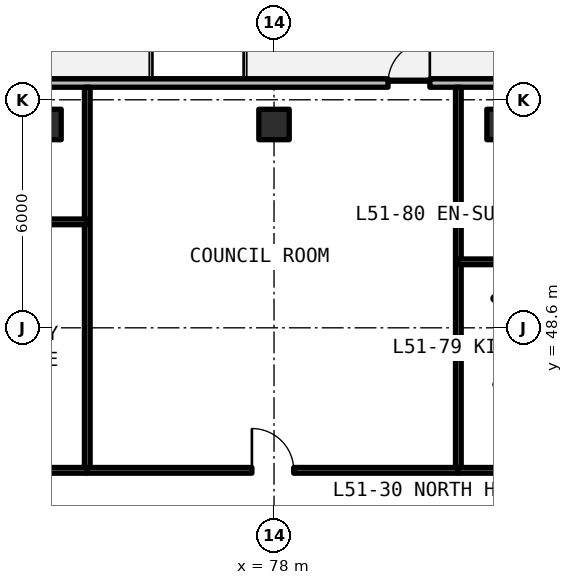
"""IFC4 building model, lengths in metres.
Left out: names, types, materials, properties, quantities, classifications, styles, units other than length and angle.
Written with IfcOpenShell. Run it as: python <this file> out.ifc"""

import sys

from ifc_helpers import new_model, si_unit, direction, frame, frame_2d, origin, origin_2d, place, context, subcontext, project, spatial, rectangle, extrude, element, fill, save


model = new_model("IFC4")
c1 = context("Model", 3, precision=1e-05, world=origin(), true_north=direction((0.0, 1.0)))
c2 = subcontext(c1, "Body", "Model", "MODEL_VIEW")
j1 = project(units=[si_unit("LENGTHUNIT", "METRE"), si_unit("PLANEANGLEUNIT", "RADIAN")], contexts=[c1])
p1 = place(None, origin())
s1 = spatial("IfcSite", under=j1, at=p1, CompositionType="ELEMENT")
p2 = place(p1, origin())
s2 = spatial("IfcBuilding", under=s1, at=p2, CompositionType="ELEMENT")
p3 = place(p2, frame((0.0, 0.0, 185.13)))
s3 = spatial("IfcBuildingStorey", under=s2, at=p3, CompositionType="ELEMENT", Elevation=185.13)
for number, where, z_axis, x_axis in (
    (1, (72.0, 53.95, 0.0), (0.0, 0.0, 1.0), (1.0, 0.0, 0.0)),
    (2, (78.0, 53.95, 0.0), (0.0, 0.0, 1.0), (1.0, 0.0, 0.0)),
    (3, (84.0, 53.95, 0.0), (0.0, 0.0, 1.0), (1.0, 0.0, 0.0)),
):
    element("IfcColumn", number, at=place(p3, frame(where, z_axis=z_axis, x_axis=x_axis)), inside=s3, PredefinedType="COLUMN", context=c2, shape_type="SweptSolid", body=[
        extrude(rectangle(XDim=0.8, YDim=0.8, at=origin_2d()), origin(), (0.0, 0.0, 1.0), 3.3),
    ])
p4 = place(p3, frame((95.354, 55.04, 0.0), z_axis=(0.0, 0.0, 1.0), x_axis=(-1.0, 0.0, 0.0)))
e4 = element("IfcWall", 4, at=p4, inside=s3, PredefinedType="SOLIDWALL", context=c2, shape_type="SweptSolid", body=[
    extrude(rectangle(XDim=43.244, YDim=0.22, at=frame_2d((21.622, 0.0))), origin(), (0.0, 0.0, 1.0), 3.08),
])
p5 = place(p4, frame((37.204, 0.0, 0.0)))
e5 = element("IfcOpeningElement", 5, at=p5, cuts=e4, PredefinedType="OPENING", context=c2, shape_type="SweptSolid", body=[
    extrude(rectangle(XDim=1.1, YDim=2.15, at=frame_2d((0.55, 1.075))), frame((0.0, 0.12, 0.0), z_axis=(0.0, -1.0, 0.0), x_axis=(1.0, 0.0, 0.0)), (0.0, 0.0, 1.0), 0.24),
])
p6 = place(p4, frame((25.104, 0.0, 0.0)))
e6 = element("IfcOpeningElement", 6, at=p6, cuts=e4, PredefinedType="OPENING", context=c2, shape_type="SweptSolid", body=[
    extrude(rectangle(XDim=1.1, YDim=2.15, at=frame_2d((0.55, 1.075))), frame((0.0, 0.12, 0.0), z_axis=(0.0, -1.0, 0.0), x_axis=(1.0, 0.0, 0.0)), (0.0, 0.0, 1.0), 0.24),
])
p7 = place(p4, frame((13.254, 0.0, 0.0)))
e7 = element("IfcOpeningElement", 7, at=p7, cuts=e4, PredefinedType="OPENING", context=c2, shape_type="SweptSolid", body=[
    extrude(rectangle(XDim=1.1, YDim=2.15, at=frame_2d((0.55, 1.075))), frame((0.0, 0.12, 0.0), z_axis=(0.0, -1.0, 0.0), x_axis=(1.0, 0.0, 0.0)), (0.0, 0.0, 1.0), 0.24),
])
p8 = place(p4, frame((32.815, 0.0, 0.78)))
e8 = element("IfcOpeningElement", 8, at=p8, cuts=e4, PredefinedType="OPENING", context=c2, shape_type="SweptSolid", body=[
    extrude(rectangle(XDim=1.65, YDim=1.66, at=frame_2d((0.825, 0.83))), frame((0.0, 0.12, 0.0), z_axis=(0.0, -1.0, 0.0), x_axis=(1.0, 0.0, 0.0)), (0.0, 0.0, 1.0), 0.24),
])
p9 = place(p4, frame((8.458, 0.0, 0.78)))
e9 = element("IfcOpeningElement", 9, at=p9, cuts=e4, PredefinedType="OPENING", context=c2, shape_type="SweptSolid", body=[
    extrude(rectangle(XDim=1.65, YDim=1.66, at=frame_2d((0.825, 0.83))), frame((0.0, 0.12, 0.0), z_axis=(0.0, -1.0, 0.0), x_axis=(1.0, 0.0, 0.0)), (0.0, 0.0, 1.0), 0.24),
])
p10 = place(p4, frame((2.303, 0.0, 0.78)))
e10 = element("IfcOpeningElement", 10, at=p10, cuts=e4, PredefinedType="OPENING", context=c2, shape_type="SweptSolid", body=[
    extrude(rectangle(XDim=1.65, YDim=1.66, at=frame_2d((0.825, 0.83))), frame((0.0, 0.12, 0.0), z_axis=(0.0, -1.0, 0.0), x_axis=(1.0, 0.0, 0.0)), (0.0, 0.0, 1.0), 0.24),
])
p11 = place(p3, frame((73.086, 44.85, 0.0), z_axis=(0.0, 0.0, 1.0), x_axis=(0.0, 1.0, 0.0)))
e11 = element("IfcWall", 11, at=p11, inside=s3, PredefinedType="SOLIDWALL", context=c2, shape_type="SweptSolid", body=[
    extrude(rectangle(XDim=10.08, YDim=0.15, at=frame_2d((5.04, 0.0))), origin(), (0.0, 0.0, 1.0), 2.35),
])
p12 = place(p3, frame((64.757, 51.388, 0.0), z_axis=(0.0, 0.0, 1.0), x_axis=(1.0, 0.0, 0.0)))
e12 = element("IfcWall", 12, at=p12, inside=s3, PredefinedType="PARTITIONING", context=c2, shape_type="SweptSolid", body=[
    extrude(rectangle(XDim=8.329, YDim=0.15, at=frame_2d((4.165, 0.0))), origin(), (0.0, 0.0, 1.0), 2.35),
])
p13 = place(p12, frame((5.361, 0.0, 0.0)))
e13 = element("IfcOpeningElement", 13, at=p13, cuts=e12, PredefinedType="OPENING", context=c2, shape_type="SweptSolid", body=[
    extrude(rectangle(XDim=0.85, YDim=2.1, at=frame_2d((0.425, 1.05))), frame((0.0, 0.085, 0.0), z_axis=(0.0, -1.0, 0.0), x_axis=(1.0, 0.0, 0.0)), (0.0, 0.0, 1.0), 0.17),
])
p14 = place(p3, frame((64.757, 44.85, 0.0), z_axis=(0.0, 0.0, 1.0), x_axis=(1.0, 0.0, 0.0)))
e14 = element("IfcWall", 14, at=p14, inside=s3, PredefinedType="SOLIDWALL", context=c2, shape_type="SweptSolid", body=[
    extrude(rectangle(XDim=8.329, YDim=0.15, at=frame_2d((4.165, 0.0))), origin(), (0.0, 0.0, 1.0), 2.35),
])
p15 = place(p14, frame((5.311, 0.0, 0.0)))
e15 = element("IfcOpeningElement", 15, at=p15, cuts=e14, PredefinedType="OPENING", context=c2, shape_type="SweptSolid", body=[
    extrude(rectangle(XDim=0.95, YDim=2.15, at=frame_2d((0.475, 1.075))), frame((0.0, 0.085, 0.0), z_axis=(0.0, -1.0, 0.0), x_axis=(1.0, 0.0, 0.0)), (0.0, 0.0, 1.0), 0.17),
])
p16 = place(p3, frame((82.85, 44.85, 0.0), z_axis=(0.0, 0.0, 1.0), x_axis=(0.0, 1.0, 0.0)))
e16 = element("IfcWall", 16, at=p16, inside=s3, PredefinedType="SOLIDWALL", context=c2, shape_type="SweptSolid", body=[
    extrude(rectangle(XDim=10.08, YDim=0.15, at=frame_2d((5.04, 0.0))), origin(), (0.0, 0.0, 1.0), 2.35),
])
p17 = place(p3, frame((73.086, 44.85, 0.0), z_axis=(0.0, 0.0, 1.0), x_axis=(1.0, 0.0, 0.0)))
e17 = element("IfcWall", 17, at=p17, inside=s3, PredefinedType="SOLIDWALL", context=c2, shape_type="SweptSolid", body=[
    extrude(rectangle(XDim=9.765, YDim=0.15, at=frame_2d((4.882, 0.0))), origin(), (0.0, 0.0, 1.0), 2.35),
])
p18 = place(p17, frame((4.333, 0.0, 0.0)))
e18 = element("IfcOpeningElement", 18, at=p18, cuts=e17, PredefinedType="OPENING", context=c2, shape_type="SweptSolid", body=[
    extrude(rectangle(XDim=1.1, YDim=2.15, at=frame_2d((0.55, 1.075))), frame((0.0, 0.085, 0.0), z_axis=(0.0, -1.0, 0.0), x_axis=(1.0, 0.0, 0.0)), (0.0, 0.0, 1.0), 0.17),
])
p19 = place(p3, frame((82.85, 48.087, 0.0), z_axis=(0.0, 0.0, 1.0), x_axis=(1.0, 0.0, 0.0)))
e19 = element("IfcWall", 19, at=p19, inside=s3, PredefinedType="PARTITIONING", context=c2, shape_type="SweptSolid", body=[
    extrude(rectangle(XDim=3.07, YDim=0.15, at=frame_2d((1.535, 0.0))), origin(), (0.0, 0.0, 1.0), 2.35),
])
p20 = place(p3, frame((82.85, 50.336, 0.0), z_axis=(0.0, 0.0, 1.0), x_axis=(1.0, 0.0, 0.0)))
e20 = element("IfcWall", 20, at=p20, inside=s3, PredefinedType="PARTITIONING", context=c2, shape_type="SweptSolid", body=[
    extrude(rectangle(XDim=12.35, YDim=0.15, at=frame_2d((6.175, 0.0))), origin(), (0.0, 0.0, 1.0), 2.35),
])
p21 = place(p20, frame((4.321, 0.0, 0.0)))
e21 = element("IfcOpeningElement", 21, at=p21, cuts=e20, PredefinedType="OPENING", context=c2, shape_type="SweptSolid", body=[
    extrude(rectangle(XDim=0.85, YDim=2.1, at=frame_2d((0.425, 1.05))), frame((0.0, 0.085, 0.0), z_axis=(0.0, -1.0, 0.0), x_axis=(1.0, 0.0, 0.0)), (0.0, 0.0, 1.0), 0.17),
])
p22 = place(p20, frame((8.961, 0.0, 0.0)))
e22 = element("IfcOpeningElement", 22, at=p22, cuts=e20, PredefinedType="OPENING", context=c2, shape_type="SweptSolid", body=[
    extrude(rectangle(XDim=0.85, YDim=2.1, at=frame_2d((0.425, 1.05))), frame((0.0, 0.085, 0.0), z_axis=(0.0, -1.0, 0.0), x_axis=(1.0, 0.0, 0.0)), (0.0, 0.0, 1.0), 0.17),
])
p23 = place(p3, frame((82.85, 44.85, 0.0), z_axis=(0.0, 0.0, 1.0), x_axis=(1.0, 0.0, 0.0)))
e23 = element("IfcWall", 23, at=p23, inside=s3, PredefinedType="SOLIDWALL", context=c2, shape_type="SweptSolid", body=[
    extrude(rectangle(XDim=12.35, YDim=0.15, at=frame_2d((6.175, 0.0))), origin(), (0.0, 0.0, 1.0), 2.35),
])
p24 = place(p23, frame((7.275, 0.0, 0.0)))
e24 = element("IfcOpeningElement", 24, at=p24, cuts=e23, PredefinedType="OPENING", context=c2, shape_type="SweptSolid", body=[
    extrude(rectangle(XDim=0.95, YDim=2.15, at=frame_2d((0.475, 1.075))), frame((0.0, 0.085, 0.0), z_axis=(0.0, -1.0, 0.0), x_axis=(1.0, 0.0, 0.0)), (0.0, 0.0, 1.0), 0.17),
])
p25 = place(p7, frame((1.1, 0.0, 0.0), z_axis=(0.0, 0.0, 1.0), x_axis=(-1.0, 0.0, 0.0)))
e25 = element("IfcDoor", 25, at=p25, inside=s3, OperationType="SINGLE_SWING_RIGHT", PredefinedType="DOOR", context=c2, shape_type="SweptSolid", body=[
    extrude(rectangle(XDim=1.1, YDim=2.15, at=frame_2d((0.55, 1.075))), frame((0.0, 0.025, 0.0), z_axis=(0.0, -1.0, 0.0), x_axis=(1.0, 0.0, 0.0)), (0.0, 0.0, 1.0), 0.05),
])
fill(e7, e25)
p26 = place(p18, origin())
e26 = element("IfcDoor", 26, at=p26, inside=s3, OperationType="SINGLE_SWING_LEFT", PredefinedType="DOOR", context=c2, shape_type="SweptSolid", body=[
    extrude(rectangle(XDim=1.1, YDim=2.15, at=frame_2d((0.55, 1.075))), frame((0.0, 0.025, 0.0), z_axis=(0.0, -1.0, 0.0), x_axis=(1.0, 0.0, 0.0)), (0.0, 0.0, 1.0), 0.05),
])
fill(e18, e26)
save(model, sys.argv[1])
